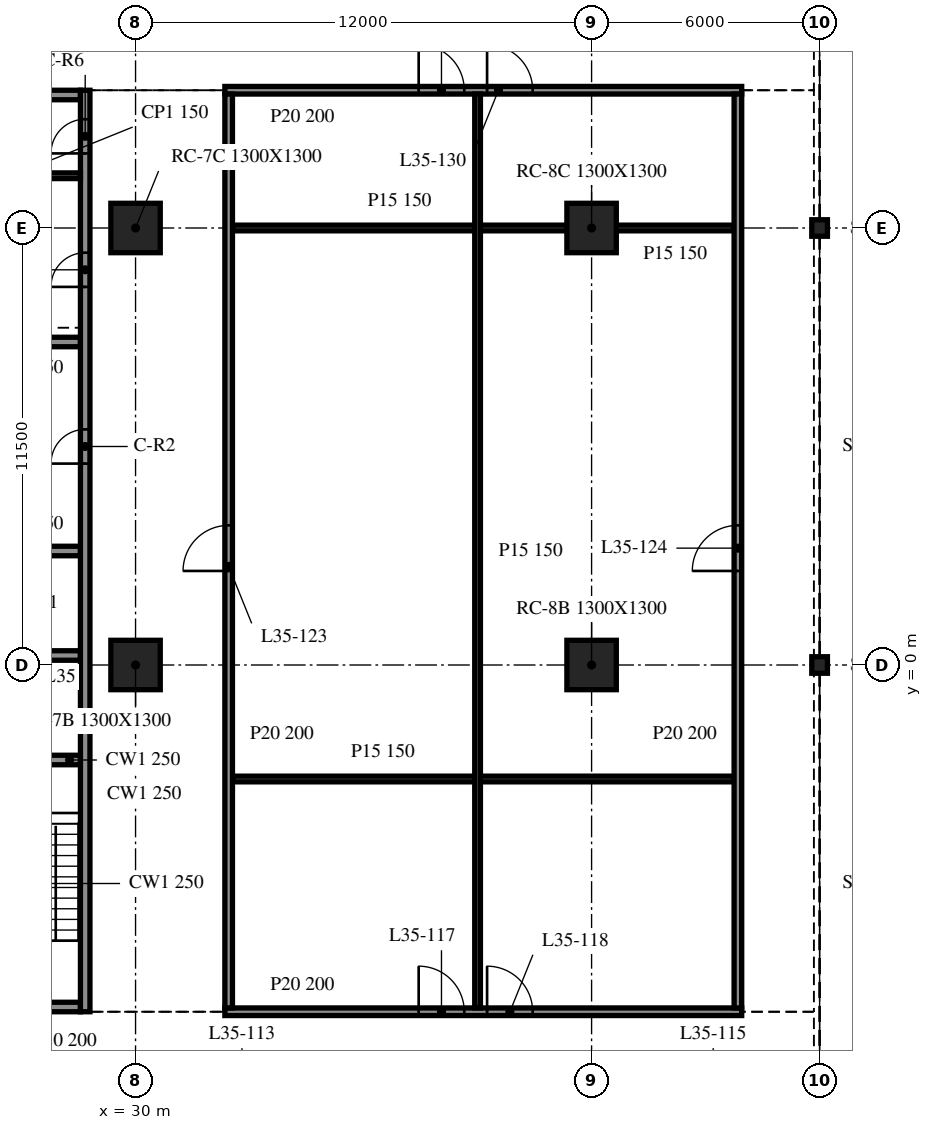
"""IFC4 building model, lengths in metres.
Left out: names, types, materials, properties, quantities, classifications, styles, units other than length and angle.
Written with IfcOpenShell. Run it as: python <this file> out.ifc"""

import sys

from ifc_helpers import new_model, si_unit, direction, frame, frame_2d, origin, origin_2d, place, context, subcontext, project, spatial, rectangle, i_section, extrude, element, fill, save


model = new_model("IFC4")
c1 = context("Model", 3, precision=1e-05, world=origin(), true_north=direction((0.0, 1.0)))
c2 = subcontext(c1, "Body", "Model", "MODEL_VIEW")
j1 = project(units=[si_unit("LENGTHUNIT", "METRE"), si_unit("PLANEANGLEUNIT", "RADIAN")], contexts=[c1])
p1 = place(None, origin())
s1 = spatial("IfcSite", under=j1, at=p1, CompositionType="ELEMENT")
p2 = place(p1, origin())
s2 = spatial("IfcBuilding", under=s1, at=p2, CompositionType="ELEMENT")
p3 = place(p2, frame((0.0, 0.0, 150.7)))
s3 = spatial("IfcBuildingStorey", under=s2, at=p3, CompositionType="ELEMENT", Elevation=150.7)
for number, where, z_axis, x_axis in (
    (1, (30.0, 0.0, -0.34), (0.0, 0.0, 1.0), (1.0, 0.0, 0.0)),
    (2, (30.0, 11.5, -0.34), (0.0, 0.0, 1.0), (1.0, 0.0, 0.0)),
    (3, (42.0, 0.0, -0.34), (0.0, 0.0, 1.0), (1.0, 0.0, 0.0)),
    (4, (42.0, 11.5, -0.34), (0.0, 0.0, 1.0), (1.0, 0.0, 0.0)),
):
    element("IfcColumn", number, at=place(p3, frame(where, z_axis=z_axis, x_axis=x_axis)), inside=s3, PredefinedType="COLUMN", context=c2, shape_type="SweptSolid", body=[
        extrude(rectangle(XDim=1.3, YDim=1.3, at=origin_2d()), origin(), (0.0, 0.0, 1.0), 3.89),
    ])
for number, where, z_axis, x_axis in (
    (5, (48.0, 0.0, -0.34), (0.0, 0.0, 1.0), (1.0, 0.0, 0.0)),
    (6, (48.0, 11.5, -0.34), (0.0, 0.0, 1.0), (1.0, 0.0, 0.0)),
):
    element("IfcColumn", number, at=place(p3, frame(where, z_axis=z_axis, x_axis=x_axis)), inside=s3, PredefinedType="COLUMN", context=c2, shape_type="SweptSolid", body=[
        extrude(i_section(OverallWidth=0.412, OverallDepth=0.434, WebThickness=0.036, FlangeThickness=0.057, at=origin_2d()), origin(), (0.0, 0.0, 1.0), 3.89),
    ])
p4 = place(p3, frame((28.675, -9.125, 0.0), z_axis=(0.0, 0.0, 1.0), x_axis=(0.0, 1.0, 0.0)))
e7 = element("IfcWall", 7, at=p4, inside=s3, PredefinedType="SOLIDWALL", context=c2, shape_type="SweptSolid", body=[
    extrude(rectangle(XDim=24.25, YDim=0.25, at=frame_2d((12.125, 0.0))), origin(), (0.0, 0.0, 1.0), 3.55),
])
p5 = place(p4, frame((14.425, 0.0, 0.0)))
e8 = element("IfcOpeningElement", 8, at=p5, cuts=e7, PredefinedType="OPENING", context=c2, shape_type="SweptSolid", body=[
    extrude(rectangle(XDim=0.9, YDim=2.1, at=frame_2d((0.45, 1.05))), frame((0.0, 0.135, 0.0), z_axis=(0.0, -1.0, 0.0), x_axis=(1.0, 0.0, 0.0)), (0.0, 0.0, 1.0), 0.27),
])
p6 = place(p4, frame((19.075, 0.0, 0.0)))
e9 = element("IfcOpeningElement", 9, at=p6, cuts=e7, PredefinedType="OPENING", context=c2, shape_type="SweptSolid", body=[
    extrude(rectangle(XDim=0.9, YDim=2.1, at=frame_2d((0.45, 1.05))), frame((0.0, 0.135, 0.0), z_axis=(0.0, -1.0, 0.0), x_axis=(1.0, 0.0, 0.0)), (0.0, 0.0, 1.0), 0.27),
])
p7 = place(p4, frame((22.587, 0.0, 0.0)))
e10 = element("IfcOpeningElement", 10, at=p7, cuts=e7, PredefinedType="OPENING", context=c2, shape_type="SweptSolid", body=[
    extrude(rectangle(XDim=0.9, YDim=2.1, at=frame_2d((0.45, 1.05))), frame((0.0, 0.135, 0.0), z_axis=(0.0, -1.0, 0.0), x_axis=(1.0, 0.0, 0.0)), (0.0, 0.0, 1.0), 0.27),
])
p8 = place(p3, frame((28.55, -9.0, 0.0), z_axis=(0.0, 0.0, 1.0), x_axis=(-1.0, 0.0, 0.0)))
e11 = element("IfcWall", 11, at=p8, inside=s3, PredefinedType="SOLIDWALL", context=c2, shape_type="SweptSolid", body=[
    extrude(rectangle(XDim=9.1, YDim=0.25, at=frame_2d((4.55, 0.0))), origin(), (0.0, 0.0, 1.0), 3.55),
])
p9 = place(p8, frame((3.65, 0.0, 0.0)))
e12 = element("IfcOpeningElement", 12, at=p9, cuts=e11, PredefinedType="OPENING", context=c2, shape_type="SweptSolid", body=[
    extrude(rectangle(XDim=1.8, YDim=2.1, at=frame_2d((0.9, 1.05))), frame((0.0, 0.135, 0.0), z_axis=(0.0, -1.0, 0.0), x_axis=(1.0, 0.0, 0.0)), (0.0, 0.0, 1.0), 0.27),
])
p10 = place(p3, frame((19.45, 15.0, 0.0), z_axis=(0.0, 0.0, 1.0), x_axis=(1.0, 0.0, 0.0)))
e13 = element("IfcWall", 13, at=p10, inside=s3, PredefinedType="SOLIDWALL", context=c2, shape_type="SweptSolid", body=[
    extrude(rectangle(XDim=9.1, YDim=0.25, at=frame_2d((4.55, 0.0))), origin(), (0.0, 0.0, 1.0), 3.55),
])
p11 = place(p10, frame((3.65, 0.0, 0.0)))
e14 = element("IfcOpeningElement", 14, at=p11, cuts=e13, PredefinedType="OPENING", context=c2, shape_type="SweptSolid", body=[
    extrude(rectangle(XDim=1.8, YDim=2.1, at=frame_2d((0.9, 1.05))), frame((0.0, 0.135, 0.0), z_axis=(0.0, -1.0, 0.0), x_axis=(1.0, 0.0, 0.0)), (0.0, 0.0, 1.0), 0.27),
])
for number, where, z_axis, x_axis in (
    (15, (25.7, -2.5, 0.0), (0.0, 0.0, 1.0), (1.0, 0.0, 0.0)),
    (16, (25.7, 0.25, 0.0), (0.0, 0.0, 1.0), (1.0, 0.0, 0.0)),
    (17, (25.7, 3.0, 0.0), (0.0, 0.0, 1.0), (1.0, 0.0, 0.0)),
    (18, (25.7, 8.5, 0.0), (0.0, 0.0, 1.0), (1.0, 0.0, 0.0)),
):
    element("IfcWall", number, at=place(p3, frame(where, z_axis=z_axis, x_axis=x_axis)), inside=s3, PredefinedType="SOLIDWALL", context=c2, shape_type="SweptSolid", body=[
        extrude(rectangle(XDim=2.85, YDim=0.25, at=frame_2d((1.425, 0.0))), origin(), (0.0, 0.0, 1.0), 3.55),
    ])
p12 = place(p3, frame((25.7, 12.875, 0.0), z_axis=(0.0, 0.0, 1.0), x_axis=(1.0, 0.0, 0.0)))
e19 = element("IfcWall", 19, at=p12, inside=s3, PredefinedType="PARTITIONING", context=c2, shape_type="SweptSolid", body=[
    extrude(rectangle(XDim=2.85, YDim=0.15, at=frame_2d((1.425, 0.0))), origin(), (0.0, 0.0, 1.0), 3.55),
])
p13 = place(p3, frame((32.35, -9.125, 0.0), z_axis=(0.0, 0.0, 1.0), x_axis=(1.0, 0.0, 0.0)))
e20 = element("IfcWall", 20, at=p13, inside=s3, PredefinedType="PARTITIONING", context=c2, shape_type="SweptSolid", body=[
    extrude(rectangle(XDim=13.6, YDim=0.2, at=frame_2d((6.8, 0.0))), origin(), (0.0, 0.0, 1.0), 3.55),
])
p14 = place(p13, frame((5.1, 0.0, 0.0)))
e21 = element("IfcOpeningElement", 21, at=p14, cuts=e20, PredefinedType="OPENING", context=c2, shape_type="SweptSolid", body=[
    extrude(rectangle(XDim=1.2, YDim=2.1, at=frame_2d((0.6, 1.05))), frame((0.0, 0.11, 0.0), z_axis=(0.0, -1.0, 0.0), x_axis=(1.0, 0.0, 0.0)), (0.0, 0.0, 1.0), 0.22),
])
p15 = place(p13, frame((6.9, 0.0, 0.0)))
e22 = element("IfcOpeningElement", 22, at=p15, cuts=e20, PredefinedType="OPENING", context=c2, shape_type="SweptSolid", body=[
    extrude(rectangle(XDim=1.2, YDim=2.1, at=frame_2d((0.6, 1.05))), frame((0.0, 0.11, 0.0), z_axis=(0.0, -1.0, 0.0), x_axis=(1.0, 0.0, 0.0)), (0.0, 0.0, 1.0), 0.22),
])
p16 = place(p3, frame((32.55, -3.0, 0.0), z_axis=(0.0, 0.0, 1.0), x_axis=(1.0, 0.0, 0.0)))
e23 = element("IfcWall", 23, at=p16, inside=s3, PredefinedType="PARTITIONING", context=c2, shape_type="SweptSolid", body=[
    extrude(rectangle(XDim=13.2, YDim=0.15, at=frame_2d((6.6, 0.0))), origin(), (0.0, 0.0, 1.0), 3.55),
])
p17 = place(p3, frame((32.55, 11.5, 0.0), z_axis=(0.0, 0.0, 1.0), x_axis=(1.0, 0.0, 0.0)))
e24 = element("IfcWall", 24, at=p17, inside=s3, PredefinedType="PARTITIONING", context=c2, shape_type="SweptSolid", body=[
    extrude(rectangle(XDim=8.8, YDim=0.15, at=frame_2d((4.4, 0.0))), origin(), (0.0, 0.0, 1.0), 3.55),
])
p18 = place(p3, frame((42.65, 11.5, 0.0), z_axis=(0.0, 0.0, 1.0), x_axis=(1.0, 0.0, 0.0)))
e25 = element("IfcWall", 25, at=p18, inside=s3, PredefinedType="PARTITIONING", context=c2, shape_type="SweptSolid", body=[
    extrude(rectangle(XDim=3.1, YDim=0.15, at=frame_2d((1.55, 0.0))), origin(), (0.0, 0.0, 1.0), 3.55),
])
p19 = place(p3, frame((32.35, 15.125, 0.0), z_axis=(0.0, 0.0, 1.0), x_axis=(1.0, 0.0, 0.0)))
e26 = element("IfcWall", 26, at=p19, inside=s3, PredefinedType="PARTITIONING", context=c2, shape_type="SweptSolid", body=[
    extrude(rectangle(XDim=13.6, YDim=0.2, at=frame_2d((6.8, 0.0))), origin(), (0.0, 0.0, 1.0), 3.55),
])
p20 = place(p19, frame((5.1, 0.0, 0.0)))
e27 = element("IfcOpeningElement", 27, at=p20, cuts=e26, PredefinedType="OPENING", context=c2, shape_type="SweptSolid", body=[
    extrude(rectangle(XDim=1.2, YDim=2.1, at=frame_2d((0.6, 1.05))), frame((0.0, 0.11, 0.0), z_axis=(0.0, -1.0, 0.0), x_axis=(1.0, 0.0, 0.0)), (0.0, 0.0, 1.0), 0.22),
])
p21 = place(p19, frame((6.9, 0.0, 0.0)))
e28 = element("IfcOpeningElement", 28, at=p21, cuts=e26, PredefinedType="OPENING", context=c2, shape_type="SweptSolid", body=[
    extrude(rectangle(XDim=1.2, YDim=2.1, at=frame_2d((0.6, 1.05))), frame((0.0, 0.11, 0.0), z_axis=(0.0, -1.0, 0.0), x_axis=(1.0, 0.0, 0.0)), (0.0, 0.0, 1.0), 0.22),
])
p22 = place(p3, frame((32.45, -9.025, 0.0), z_axis=(0.0, 0.0, 1.0), x_axis=(0.0, 1.0, 0.0)))
e29 = element("IfcWall", 29, at=p22, inside=s3, PredefinedType="PARTITIONING", context=c2, shape_type="SweptSolid", body=[
    extrude(rectangle(XDim=24.05, YDim=0.2, at=frame_2d((12.025, 0.0))), origin(), (0.0, 0.0, 1.0), 3.55),
])
p23 = place(p22, frame((11.5, 0.0, 0.0)))
e30 = element("IfcOpeningElement", 30, at=p23, cuts=e29, PredefinedType="OPENING", context=c2, shape_type="SweptSolid", body=[
    extrude(rectangle(XDim=1.2, YDim=2.1, at=frame_2d((0.6, 1.05))), frame((0.0, 0.11, 0.0), z_axis=(0.0, -1.0, 0.0), x_axis=(1.0, 0.0, 0.0)), (0.0, 0.0, 1.0), 0.22),
])
p24 = place(p3, frame((39.0, -9.025, 0.0), z_axis=(0.0, 0.0, 1.0), x_axis=(0.0, 1.0, 0.0)))
e31 = element("IfcWall", 31, at=p24, inside=s3, PredefinedType="PARTITIONING", context=c2, shape_type="SweptSolid", body=[
    extrude(rectangle(XDim=24.05, YDim=0.15, at=frame_2d((12.025, 0.0))), origin(), (0.0, 0.0, 1.0), 3.55),
])
p25 = place(p3, frame((45.85, -9.025, 0.0), z_axis=(0.0, 0.0, 1.0), x_axis=(0.0, 1.0, 0.0)))
e32 = element("IfcWall", 32, at=p25, inside=s3, PredefinedType="PARTITIONING", context=c2, shape_type="SweptSolid", body=[
    extrude(rectangle(XDim=24.05, YDim=0.2, at=frame_2d((12.025, 0.0))), origin(), (0.0, 0.0, 1.0), 3.55),
])
p26 = place(p25, frame((11.5, 0.0, 0.0)))
e33 = element("IfcOpeningElement", 33, at=p26, cuts=e32, PredefinedType="OPENING", context=c2, shape_type="SweptSolid", body=[
    extrude(rectangle(XDim=1.2, YDim=2.1, at=frame_2d((0.6, 1.05))), frame((0.0, 0.11, 0.0), z_axis=(0.0, -1.0, 0.0), x_axis=(1.0, 0.0, 0.0)), (0.0, 0.0, 1.0), 0.22),
])
p27 = place(p5, origin())
e34 = element("IfcDoor", 34, at=p27, inside=s3, OperationType="SINGLE_SWING_RIGHT", PredefinedType="DOOR", context=c2, shape_type="SweptSolid", body=[
    extrude(rectangle(XDim=0.9, YDim=2.1, at=frame_2d((0.45, 1.05))), frame((0.0, 0.025, 0.0), z_axis=(0.0, -1.0, 0.0), x_axis=(1.0, 0.0, 0.0)), (0.0, 0.0, 1.0), 0.05),
])
fill(e8, e34)
p28 = place(p6, origin())
e35 = element("IfcDoor", 35, at=p28, inside=s3, OperationType="SINGLE_SWING_LEFT", PredefinedType="DOOR", context=c2, shape_type="SweptSolid", body=[
    extrude(rectangle(XDim=0.9, YDim=2.1, at=frame_2d((0.45, 1.05))), frame((0.0, 0.025, 0.0), z_axis=(0.0, -1.0, 0.0), x_axis=(1.0, 0.0, 0.0)), (0.0, 0.0, 1.0), 0.05),
])
fill(e9, e35)
p29 = place(p7, origin())
e36 = element("IfcDoor", 36, at=p29, inside=s3, OperationType="SINGLE_SWING_RIGHT", PredefinedType="DOOR", context=c2, shape_type="SweptSolid", body=[
    extrude(rectangle(XDim=0.9, YDim=2.1, at=frame_2d((0.45, 1.05))), frame((0.0, 0.025, 0.0), z_axis=(0.0, -1.0, 0.0), x_axis=(1.0, 0.0, 0.0)), (0.0, 0.0, 1.0), 0.05),
])
fill(e10, e36)
p30 = place(p14, origin())
e37 = element("IfcDoor", 37, at=p30, inside=s3, OperationType="SINGLE_SWING_LEFT", PredefinedType="DOOR", context=c2, shape_type="SweptSolid", body=[
    extrude(rectangle(XDim=1.2, YDim=2.1, at=frame_2d((0.6, 1.05))), frame((0.0, 0.025, 0.0), z_axis=(0.0, -1.0, 0.0), x_axis=(1.0, 0.0, 0.0)), (0.0, 0.0, 1.0), 0.05),
])
fill(e21, e37)
p31 = place(p15, origin())
e38 = element("IfcDoor", 38, at=p31, inside=s3, OperationType="SINGLE_SWING_RIGHT", PredefinedType="DOOR", context=c2, shape_type="SweptSolid", body=[
    extrude(rectangle(XDim=1.2, YDim=2.1, at=frame_2d((0.6, 1.05))), frame((0.0, 0.025, 0.0), z_axis=(0.0, -1.0, 0.0), x_axis=(1.0, 0.0, 0.0)), (0.0, 0.0, 1.0), 0.05),
])
fill(e22, e38)
p32 = place(p23, origin())
e39 = element("IfcDoor", 39, at=p32, inside=s3, OperationType="SINGLE_SWING_LEFT", PredefinedType="DOOR", context=c2, shape_type="SweptSolid", body=[
    extrude(rectangle(XDim=1.2, YDim=2.1, at=frame_2d((0.6, 1.05))), frame((0.0, 0.025, 0.0), z_axis=(0.0, -1.0, 0.0), x_axis=(1.0, 0.0, 0.0)), (0.0, 0.0, 1.0), 0.05),
])
fill(e30, e39)
p33 = place(p26, origin())
e40 = element("IfcDoor", 40, at=p33, inside=s3, OperationType="SINGLE_SWING_RIGHT", PredefinedType="DOOR", context=c2, shape_type="SweptSolid", body=[
    extrude(rectangle(XDim=1.2, YDim=2.1, at=frame_2d((0.6, 1.05))), frame((0.0, 0.025, 0.0), z_axis=(0.0, -1.0, 0.0), x_axis=(1.0, 0.0, 0.0)), (0.0, 0.0, 1.0), 0.05),
])
fill(e33, e40)
p34 = place(p20, origin())
e41 = element("IfcDoor", 41, at=p34, inside=s3, OperationType="SINGLE_SWING_RIGHT", PredefinedType="DOOR", context=c2, shape_type="SweptSolid", body=[
    extrude(rectangle(XDim=1.2, YDim=2.1, at=frame_2d((0.6, 1.05))), frame((0.0, 0.025, 0.0), z_axis=(0.0, -1.0, 0.0), x_axis=(1.0, 0.0, 0.0)), (0.0, 0.0, 1.0), 0.05),
])
fill(e27, e41)
p35 = place(p21, origin())
e42 = element("IfcDoor", 42, at=p35, inside=s3, OperationType="SINGLE_SWING_LEFT", PredefinedType="DOOR", context=c2, shape_type="SweptSolid", body=[
    extrude(rectangle(XDim=1.2, YDim=2.1, at=frame_2d((0.6, 1.05))), frame((0.0, 0.025, 0.0), z_axis=(0.0, -1.0, 0.0), x_axis=(1.0, 0.0, 0.0)), (0.0, 0.0, 1.0), 0.05),
])
fill(e28, e42)
save(model, sys.argv[1])
